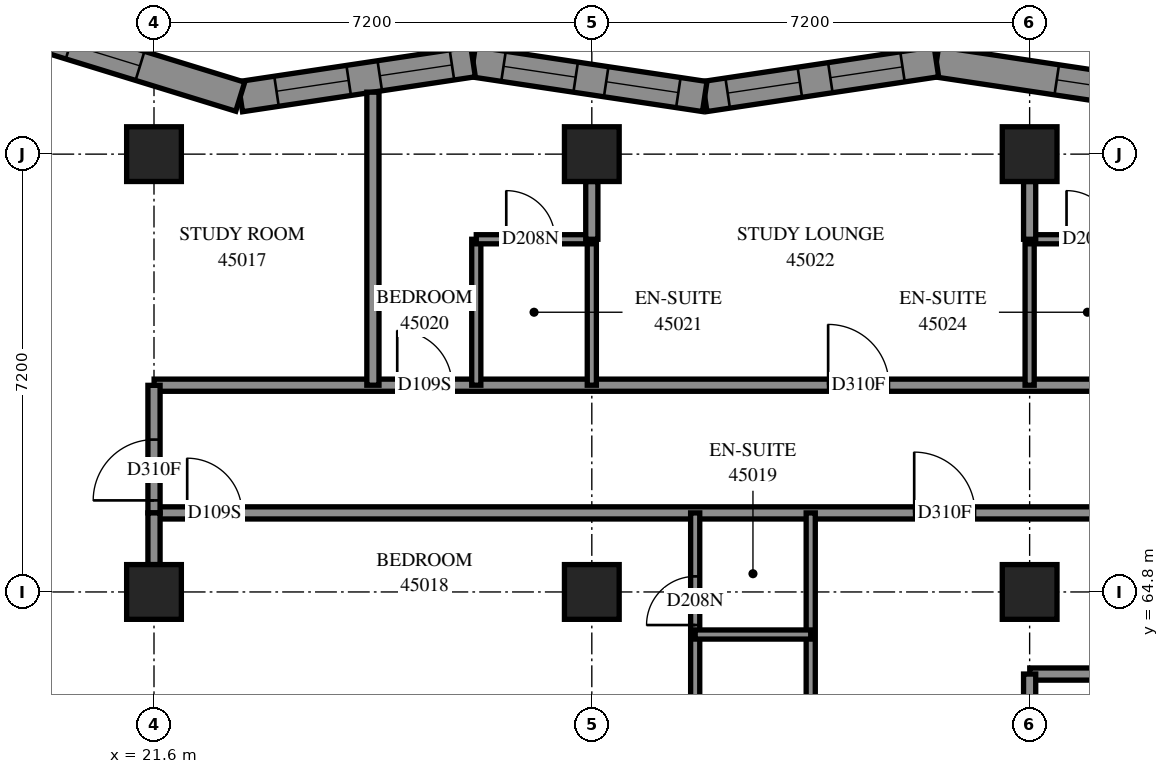
"""IFC4 building model, lengths in metres.
Left out: names, types, materials, properties, quantities, classifications, styles, units other than length and angle.
Written with IfcOpenShell. Run it as: python <this file> out.ifc"""

import sys

from ifc_helpers import new_model, si_unit, direction, frame, frame_2d, origin, origin_2d, place, context, subcontext, project, spatial, polyline, rectangle, outline, extrude, element, fill, save


model = new_model("IFC4")
c1 = context("Model", 3, precision=1e-05, world=origin(), true_north=direction((0.0, 1.0)))
c2 = subcontext(c1, "Body", "Model", "MODEL_VIEW")
j1 = project(units=[si_unit("LENGTHUNIT", "METRE"), si_unit("PLANEANGLEUNIT", "RADIAN")], contexts=[c1])
p1 = place(None, origin())
s1 = spatial("IfcSite", under=j1, at=p1, CompositionType="ELEMENT")
p2 = place(p1, origin())
s2 = spatial("IfcBuilding", under=s1, at=p2, CompositionType="ELEMENT")
p3 = place(p2, frame((0.0, 0.0, 166.0)))
s3 = spatial("IfcBuildingStorey", under=s2, at=p3, CompositionType="ELEMENT", Elevation=166.0)
for number, where, z_axis, x_axis in (
    (1, (21.6, 64.8, 0.0), (0.0, 0.0, 1.0), (1.0, 0.0, 0.0)),
    (2, (21.6, 72.0, 0.0), (0.0, 0.0, 1.0), (1.0, 0.0, 0.0)),
    (3, (28.8, 64.8, 0.0), (0.0, 0.0, 1.0), (1.0, 0.0, 0.0)),
    (4, (28.8, 72.0, 0.0), (0.0, 0.0, 1.0), (1.0, 0.0, 0.0)),
    (5, (36.0, 64.8, 0.0), (0.0, 0.0, 1.0), (1.0, 0.0, 0.0)),
    (6, (36.0, 72.0, 0.0), (0.0, 0.0, 1.0), (1.0, 0.0, 0.0)),
):
    element("IfcColumn", number, at=place(p3, frame(where, z_axis=z_axis, x_axis=x_axis)), inside=s3, PredefinedType="COLUMN", context=c2, shape_type="SweptSolid", body=[
        extrude(rectangle(XDim=0.9, YDim=0.9, at=origin_2d()), origin(), (0.0, 0.0, 1.0), 3.1),
    ])
p4 = place(p3, frame((38.276, 72.947, 0.0), z_axis=(0.0, 0.0, 1.0), x_axis=(-0.9889155896, 0.1484788086, 0.0)))
e7 = element("IfcWall", 7, at=p4, inside=s3, PredefinedType="SOLIDWALL", context=c2, shape_type="SweptSolid", body=[
    extrude(outline(polyline([(0.037, -0.25), (3.89, -0.25), (3.815, 0.25), (-0.037, 0.25), (0.037, -0.25)])), origin(), (0.0, 0.0, 1.0), 3.1),
])
p5 = place(p4, frame((0.651, 0.0, 0.45)))
e8 = element("IfcOpeningElement", 8, at=p5, cuts=e7, PredefinedType="OPENING", context=c2, shape_type="SweptSolid", body=[
    extrude(rectangle(XDim=1.2, YDim=2.5, at=frame_2d((0.6, 1.25))), frame((0.0, 0.26, 0.0), z_axis=(0.0, -1.0, 0.0), x_axis=(1.0, 0.0, 0.0)), (0.0, 0.0, 1.0), 0.52),
])
p6 = place(p3, frame((34.467, 73.519, 0.0), z_axis=(0.0, 0.0, 1.0), x_axis=(-0.9889150173, -0.1484826202, 0.0)))
e9 = element("IfcWall", 9, at=p6, inside=s3, PredefinedType="SOLIDWALL", context=c2, shape_type="SweptSolid", body=[
    extrude(outline(polyline([(-0.037, -0.25), (3.815, -0.25), (3.89, 0.25), (0.037, 0.25), (-0.037, -0.25)])), origin(), (0.0, 0.0, 1.0), 3.1),
])
p7 = place(p6, frame((0.564, 0.0, 0.45)))
e10 = element("IfcOpeningElement", 10, at=p7, cuts=e9, PredefinedType="OPENING", context=c2, shape_type="SweptSolid", body=[
    extrude(rectangle(XDim=1.2, YDim=2.5, at=frame_2d((0.6, 1.25))), frame((0.0, 0.26, 0.0), z_axis=(0.0, -1.0, 0.0), x_axis=(1.0, 0.0, 0.0)), (0.0, 0.0, 1.0), 0.52),
])
p8 = place(p6, frame((2.271, 0.0, 0.45)))
e11 = element("IfcOpeningElement", 11, at=p8, cuts=e9, PredefinedType="OPENING", context=c2, shape_type="SweptSolid", body=[
    extrude(rectangle(XDim=1.2, YDim=2.5, at=frame_2d((0.6, 1.25))), frame((0.0, 0.26, 0.0), z_axis=(0.0, -1.0, 0.0), x_axis=(1.0, 0.0, 0.0)), (0.0, 0.0, 1.0), 0.52),
])
p9 = place(p3, frame((30.657, 72.947, 0.0), z_axis=(0.0, 0.0, 1.0), x_axis=(-0.9889155896, 0.1484788086, 0.0)))
e12 = element("IfcWall", 12, at=p9, inside=s3, PredefinedType="SOLIDWALL", context=c2, shape_type="SweptSolid", body=[
    extrude(outline(polyline([(0.037, -0.25), (3.89, -0.25), (3.815, 0.25), (-0.037, 0.25), (0.037, -0.25)])), origin(), (0.0, 0.0, 1.0), 3.1),
])
p10 = place(p9, frame((0.439, 0.0, 0.45)))
e13 = element("IfcOpeningElement", 13, at=p10, cuts=e12, PredefinedType="OPENING", context=c2, shape_type="SweptSolid", body=[
    extrude(rectangle(XDim=1.2, YDim=2.5, at=frame_2d((0.6, 1.25))), frame((0.0, 0.26, 0.0), z_axis=(0.0, -1.0, 0.0), x_axis=(1.0, 0.0, 0.0)), (0.0, 0.0, 1.0), 0.52),
])
p11 = place(p9, frame((2.146, 0.0, 0.45)))
e14 = element("IfcOpeningElement", 14, at=p11, cuts=e12, PredefinedType="OPENING", context=c2, shape_type="SweptSolid", body=[
    extrude(rectangle(XDim=1.2, YDim=2.5, at=frame_2d((0.6, 1.25))), frame((0.0, 0.26, 0.0), z_axis=(0.0, -1.0, 0.0), x_axis=(1.0, 0.0, 0.0)), (0.0, 0.0, 1.0), 0.52),
])
p12 = place(p3, frame((26.847, 73.519, 0.0), z_axis=(0.0, 0.0, 1.0), x_axis=(-0.9889143658, -0.1484869591, 0.0)))
e15 = element("IfcWall", 15, at=p12, inside=s3, PredefinedType="SOLIDWALL", context=c2, shape_type="SweptSolid", body=[
    extrude(outline(polyline([(-0.037, -0.25), (3.815, -0.25), (3.929, 0.25), (0.037, 0.25), (-0.037, -0.25)])), origin(), (0.0, 0.0, 1.0), 3.1),
])
p13 = place(p12, frame((0.352, 0.0, 0.45)))
e16 = element("IfcOpeningElement", 16, at=p13, cuts=e15, PredefinedType="OPENING", context=c2, shape_type="SweptSolid", body=[
    extrude(rectangle(XDim=1.2, YDim=2.5, at=frame_2d((0.6, 1.25))), frame((0.0, 0.26, 0.0), z_axis=(0.0, -1.0, 0.0), x_axis=(1.0, 0.0, 0.0)), (0.0, 0.0, 1.0), 0.52),
])
p14 = place(p12, frame((2.069, 0.0, 0.45)))
e17 = element("IfcOpeningElement", 17, at=p14, cuts=e15, PredefinedType="OPENING", context=c2, shape_type="SweptSolid", body=[
    extrude(rectangle(XDim=1.2, YDim=2.5, at=frame_2d((0.6, 1.25))), frame((0.0, 0.26, 0.0), z_axis=(0.0, -1.0, 0.0), x_axis=(1.0, 0.0, 0.0)), (0.0, 0.0, 1.0), 0.52),
])
p15 = place(p3, frame((23.018, 72.944, 0.0), z_axis=(0.0, 0.0, 1.0), x_axis=(-0.9557930164, 0.2940403201, 0.0)))
e18 = element("IfcWall", 18, at=p15, inside=s3, PredefinedType="SOLIDWALL", context=c2, shape_type="SweptSolid", body=[
    extrude(outline(polyline([(0.057, -0.25), (4.043, -0.25), (3.366, 0.25), (-0.057, 0.25), (0.057, -0.25)])), origin(), (0.0, 0.0, 1.0), 3.1),
])
p16 = place(p15, frame((1.725, 0.0, 0.45)))
e19 = element("IfcOpeningElement", 19, at=p16, cuts=e18, PredefinedType="OPENING", context=c2, shape_type="SweptSolid", body=[
    extrude(rectangle(XDim=1.2, YDim=2.5, at=frame_2d((0.6, 1.25))), frame((0.0, 0.26, 0.0), z_axis=(0.0, -1.0, 0.0), x_axis=(1.0, 0.0, 0.0)), (0.0, 0.0, 1.0), 0.52),
])
p17 = place(p3, frame((21.602, 68.2, 0.0), z_axis=(0.0, 0.0, 1.0), x_axis=(1.0, 0.0, 0.0)))
e20 = element("IfcWall", 20, at=p17, inside=s3, PredefinedType="PARTITIONING", context=c2, shape_type="SweptSolid", body=[
    extrude(rectangle(XDim=19.048, YDim=0.2, at=frame_2d((9.524, 0.0))), origin(), (0.0, 0.0, 1.0), 3.1),
])
p18 = place(p17, frame((3.998, 0.0, 0.0)))
e21 = element("IfcOpeningElement", 21, at=p18, cuts=e20, PredefinedType="OPENING", context=c2, shape_type="SweptSolid", body=[
    extrude(rectangle(XDim=0.9, YDim=2.1, at=frame_2d((0.45, 1.05))), frame((0.0, 0.11, 0.0), z_axis=(0.0, -1.0, 0.0), x_axis=(1.0, 0.0, 0.0)), (0.0, 0.0, 1.0), 0.22),
])
p19 = place(p17, frame((11.084, 0.0, 0.0)))
e22 = element("IfcOpeningElement", 22, at=p19, cuts=e20, PredefinedType="OPENING", context=c2, shape_type="SweptSolid", body=[
    extrude(rectangle(XDim=1.0, YDim=2.1, at=frame_2d((0.5, 1.05))), frame((0.0, 0.11, 0.0), z_axis=(0.0, -1.0, 0.0), x_axis=(1.0, 0.0, 0.0)), (0.0, 0.0, 1.0), 0.22),
])
p20 = place(p17, frame((16.748, 0.0, 0.0)))
e23 = element("IfcOpeningElement", 23, at=p20, cuts=e20, PredefinedType="OPENING", context=c2, shape_type="SweptSolid", body=[
    extrude(rectangle(XDim=0.9, YDim=2.1, at=frame_2d((0.45, 1.05))), frame((0.0, 0.11, 0.0), z_axis=(0.0, -1.0, 0.0), x_axis=(1.0, 0.0, 0.0)), (0.0, 0.0, 1.0), 0.22),
])
p21 = place(p3, frame((21.6, 66.1, 0.0), z_axis=(0.0, 0.0, 1.0), x_axis=(1.0, 0.0, 0.0)))
e24 = element("IfcWall", 24, at=p21, inside=s3, PredefinedType="PARTITIONING", context=c2, shape_type="SweptSolid", body=[
    extrude(rectangle(XDim=16.95, YDim=0.2, at=frame_2d((8.475, 0.0))), origin(), (0.0, 0.0, 1.0), 3.1),
])
p22 = place(p21, frame((0.546, 0.0, 0.0)))
e25 = element("IfcOpeningElement", 25, at=p22, cuts=e24, PredefinedType="OPENING", context=c2, shape_type="SweptSolid", body=[
    extrude(rectangle(XDim=0.9, YDim=2.1, at=frame_2d((0.45, 1.05))), frame((0.0, 0.11, 0.0), z_axis=(0.0, -1.0, 0.0), x_axis=(1.0, 0.0, 0.0)), (0.0, 0.0, 1.0), 0.22),
])
p23 = place(p21, frame((12.502, 0.0, 0.0)))
e26 = element("IfcOpeningElement", 26, at=p23, cuts=e24, PredefinedType="OPENING", context=c2, shape_type="SweptSolid", body=[
    extrude(rectangle(XDim=1.0, YDim=2.1, at=frame_2d((0.5, 1.05))), frame((0.0, 0.11, 0.0), z_axis=(0.0, -1.0, 0.0), x_axis=(1.0, 0.0, 0.0)), (0.0, 0.0, 1.0), 0.22),
])
p24 = place(p3, frame((25.2, 68.2, 0.0), z_axis=(0.0, 0.0, 1.0), x_axis=(0.0, 1.0, 0.0)))
e27 = element("IfcWall", 27, at=p24, inside=s3, PredefinedType="PARTITIONING", context=c2, shape_type="SweptSolid", body=[
    extrude(rectangle(XDim=4.819, YDim=0.2, at=frame_2d((2.409, 0.0))), origin(), (0.0, 0.0, 1.0), 3.1),
])
p25 = place(p3, frame((32.4, 62.928, 0.0), z_axis=(0.0, 0.0, 1.0), x_axis=(0.0, 1.0, 0.0)))
e28 = element("IfcWall", 28, at=p25, inside=s3, PredefinedType="PARTITIONING", context=c2, shape_type="SweptSolid", body=[
    extrude(rectangle(XDim=3.172, YDim=0.15, at=frame_2d((1.586, 0.0))), origin(), (0.0, 0.0, 1.0), 3.1),
])
p26 = place(p3, frame((30.5, 62.928, 0.0), z_axis=(0.0, 0.0, 1.0), x_axis=(0.0, 1.0, 0.0)))
e29 = element("IfcWall", 29, at=p26, inside=s3, PredefinedType="PARTITIONING", context=c2, shape_type="SweptSolid", body=[
    extrude(rectangle(XDim=3.172, YDim=0.15, at=frame_2d((1.586, 0.0))), origin(), (0.0, 0.0, 1.0), 3.1),
])
p27 = place(p26, frame((1.328, 0.0, 0.0)))
e30 = element("IfcOpeningElement", 30, at=p27, cuts=e29, PredefinedType="OPENING", context=c2, shape_type="SweptSolid", body=[
    extrude(rectangle(XDim=0.8, YDim=2.1, at=frame_2d((0.4, 1.05))), frame((0.0, 0.085, 0.0), z_axis=(0.0, -1.0, 0.0), x_axis=(1.0, 0.0, 0.0)), (0.0, 0.0, 1.0), 0.17),
])
p28 = place(p3, frame((36.002, 63.45, 0.0), z_axis=(0.0, 0.0, 1.0), x_axis=(1.0, 0.0, 0.0)))
e31 = element("IfcWall", 31, at=p28, inside=s3, PredefinedType="PARTITIONING", context=c2, shape_type="SweptSolid", body=[
    extrude(rectangle(XDim=2.548, YDim=0.2, at=frame_2d((1.274, 0.0))), origin(), (0.0, 0.0, 1.0), 3.1),
])
for number, where, z_axis, x_axis in (
    (32, (26.9, 68.2, 0.0), (0.0, 0.0, 1.0), (0.0, 1.0, 0.0)),
    (33, (28.8, 68.2, 0.0), (0.0, 0.0, 1.0), (0.0, 1.0, 0.0)),
    (34, (36.0, 68.2, 0.0), (0.0, 0.0, 1.0), (0.0, 1.0, 0.0)),
):
    element("IfcWall", number, at=place(p3, frame(where, z_axis=z_axis, x_axis=x_axis)), inside=s3, PredefinedType="PARTITIONING", context=c2, shape_type="SweptSolid", body=[
        extrude(rectangle(XDim=2.4, YDim=0.15, at=frame_2d((1.2, 0.0))), origin(), (0.0, 0.0, 1.0), 3.1),
    ])
p29 = place(p3, frame((36.0, 61.35, 0.0), z_axis=(0.0, 0.0, 1.0), x_axis=(0.0, 1.0, 0.0)))
e35 = element("IfcWall", 35, at=p29, inside=s3, PredefinedType="PARTITIONING", context=c2, shape_type="SweptSolid", body=[
    extrude(rectangle(XDim=2.1, YDim=0.2, at=frame_2d((1.05, 0.0))), origin(), (0.0, 0.0, 1.0), 2.6),
])
p30 = place(p3, frame((21.6, 66.1, 0.0), z_axis=(0.0, 0.0, 1.0), x_axis=(0.0, 1.0, 0.0)))
e36 = element("IfcWall", 36, at=p30, inside=s3, PredefinedType="PARTITIONING", context=c2, shape_type="SweptSolid", body=[
    extrude(rectangle(XDim=2.098, YDim=0.2, at=frame_2d((1.049, 0.0))), origin(), (0.0, 0.0, 1.0), 2.6),
])
p31 = place(p30, frame((0.206, 0.0, 0.0)))
e37 = element("IfcOpeningElement", 37, at=p31, cuts=e36, PredefinedType="OPENING", context=c2, shape_type="SweptSolid", body=[
    extrude(rectangle(XDim=1.0, YDim=2.1, at=frame_2d((0.5, 1.05))), frame((0.0, 0.11, 0.0), z_axis=(0.0, -1.0, 0.0), x_axis=(1.0, 0.0, 0.0)), (0.0, 0.0, 1.0), 0.22),
])
p32 = place(p3, frame((26.9, 70.6, 0.0), z_axis=(0.0, 0.0, 1.0), x_axis=(1.0, 0.0, 0.0)))
e38 = element("IfcWall", 38, at=p32, inside=s3, PredefinedType="PARTITIONING", context=c2, shape_type="SweptSolid", body=[
    extrude(rectangle(XDim=1.9, YDim=0.15, at=frame_2d((0.95, 0.0))), origin(), (0.0, 0.0, 1.0), 3.1),
])
p33 = place(p32, frame((0.493, 0.0, 0.0)))
e39 = element("IfcOpeningElement", 39, at=p33, cuts=e38, PredefinedType="OPENING", context=c2, shape_type="SweptSolid", body=[
    extrude(rectangle(XDim=0.8, YDim=2.1, at=frame_2d((0.4, 1.05))), frame((0.0, 0.085, 0.0), z_axis=(0.0, -1.0, 0.0), x_axis=(1.0, 0.0, 0.0)), (0.0, 0.0, 1.0), 0.17),
])
p34 = place(p3, frame((36.0, 70.6, 0.0), z_axis=(0.0, 0.0, 1.0), x_axis=(1.0, 0.0, 0.0)))
e40 = element("IfcWall", 40, at=p34, inside=s3, PredefinedType="PARTITIONING", context=c2, shape_type="SweptSolid", body=[
    extrude(rectangle(XDim=1.9, YDim=0.15, at=frame_2d((0.95, 0.0))), origin(), (0.0, 0.0, 1.0), 3.1),
])
p35 = place(p34, frame((0.607, 0.0, 0.0)))
e41 = element("IfcOpeningElement", 41, at=p35, cuts=e40, PredefinedType="OPENING", context=c2, shape_type="SweptSolid", body=[
    extrude(rectangle(XDim=0.8, YDim=2.1, at=frame_2d((0.4, 1.05))), frame((0.0, 0.085, 0.0), z_axis=(0.0, -1.0, 0.0), x_axis=(1.0, 0.0, 0.0)), (0.0, 0.0, 1.0), 0.17),
])
p36 = place(p3, frame((30.5, 64.1, 0.0), z_axis=(0.0, 0.0, 1.0), x_axis=(1.0, 0.0, 0.0)))
e42 = element("IfcWall", 42, at=p36, inside=s3, PredefinedType="PARTITIONING", context=c2, shape_type="SweptSolid", body=[
    extrude(rectangle(XDim=1.9, YDim=0.15, at=frame_2d((0.95, 0.0))), origin(), (0.0, 0.0, 1.0), 3.1),
])
for number, where, z_axis, x_axis in (
    (43, (28.8, 70.6, 0.0), (0.0, 0.0, 1.0), (0.0, 1.0, 0.0)),
    (44, (36.0, 70.6, 0.0), (0.0, 0.0, 1.0), (0.0, 1.0, 0.0)),
):
    element("IfcWall", number, at=place(p3, frame(where, z_axis=z_axis, x_axis=x_axis)), inside=s3, PredefinedType="PARTITIONING", context=c2, shape_type="SweptSolid", body=[
        extrude(rectangle(XDim=0.95, YDim=0.2, at=frame_2d((0.475, 0.0))), origin(), (0.0, 0.0, 1.0), 3.1),
    ])
p37 = place(p3, frame((21.6, 65.25, 0.0), z_axis=(0.0, 0.0, 1.0), x_axis=(0.0, 1.0, 0.0)))
e45 = element("IfcWall", 45, at=p37, inside=s3, PredefinedType="PARTITIONING", context=c2, shape_type="SweptSolid", body=[
    extrude(rectangle(XDim=0.85, YDim=0.2, at=frame_2d((0.425, 0.0))), origin(), (0.0, 0.0, 1.0), 2.6),
])
p38 = place(p5, origin())
e46 = element("IfcWindow", 46, at=p38, inside=s3, PartitioningType="SINGLE_PANEL", PredefinedType="WINDOW", context=c2, shape_type="SweptSolid", body=[
    extrude(rectangle(XDim=1.2, YDim=2.5, at=frame_2d((0.6, 1.25))), frame((0.0, 0.18, 0.0), z_axis=(0.0, -1.0, 0.0), x_axis=(1.0, 0.0, 0.0)), (0.0, 0.0, 1.0), 0.06),
])
fill(e8, e46)
p39 = place(p7, origin())
e47 = element("IfcWindow", 47, at=p39, inside=s3, PartitioningType="SINGLE_PANEL", PredefinedType="WINDOW", context=c2, shape_type="SweptSolid", body=[
    extrude(rectangle(XDim=1.2, YDim=2.5, at=frame_2d((0.6, 1.25))), frame((0.0, 0.18, 0.0), z_axis=(0.0, -1.0, 0.0), x_axis=(1.0, 0.0, 0.0)), (0.0, 0.0, 1.0), 0.06),
])
fill(e10, e47)
p40 = place(p8, origin())
e48 = element("IfcWindow", 48, at=p40, inside=s3, PartitioningType="SINGLE_PANEL", PredefinedType="WINDOW", context=c2, shape_type="SweptSolid", body=[
    extrude(rectangle(XDim=1.2, YDim=2.5, at=frame_2d((0.6, 1.25))), frame((0.0, 0.18, 0.0), z_axis=(0.0, -1.0, 0.0), x_axis=(1.0, 0.0, 0.0)), (0.0, 0.0, 1.0), 0.06),
])
fill(e11, e48)
p41 = place(p10, origin())
e49 = element("IfcWindow", 49, at=p41, inside=s3, PartitioningType="SINGLE_PANEL", PredefinedType="WINDOW", context=c2, shape_type="SweptSolid", body=[
    extrude(rectangle(XDim=1.2, YDim=2.5, at=frame_2d((0.6, 1.25))), frame((0.0, 0.18, 0.0), z_axis=(0.0, -1.0, 0.0), x_axis=(1.0, 0.0, 0.0)), (0.0, 0.0, 1.0), 0.06),
])
fill(e13, e49)
p42 = place(p11, origin())
e50 = element("IfcWindow", 50, at=p42, inside=s3, PartitioningType="SINGLE_PANEL", PredefinedType="WINDOW", context=c2, shape_type="SweptSolid", body=[
    extrude(rectangle(XDim=1.2, YDim=2.5, at=frame_2d((0.6, 1.25))), frame((0.0, 0.18, 0.0), z_axis=(0.0, -1.0, 0.0), x_axis=(1.0, 0.0, 0.0)), (0.0, 0.0, 1.0), 0.06),
])
fill(e14, e50)
p43 = place(p13, origin())
e51 = element("IfcWindow", 51, at=p43, inside=s3, PartitioningType="SINGLE_PANEL", PredefinedType="WINDOW", context=c2, shape_type="SweptSolid", body=[
    extrude(rectangle(XDim=1.2, YDim=2.5, at=frame_2d((0.6, 1.25))), frame((0.0, 0.18, 0.0), z_axis=(0.0, -1.0, 0.0), x_axis=(1.0, 0.0, 0.0)), (0.0, 0.0, 1.0), 0.06),
])
fill(e16, e51)
p44 = place(p14, origin())
e52 = element("IfcWindow", 52, at=p44, inside=s3, PartitioningType="SINGLE_PANEL", PredefinedType="WINDOW", context=c2, shape_type="SweptSolid", body=[
    extrude(rectangle(XDim=1.2, YDim=2.5, at=frame_2d((0.6, 1.25))), frame((0.0, 0.18, 0.0), z_axis=(0.0, -1.0, 0.0), x_axis=(1.0, 0.0, 0.0)), (0.0, 0.0, 1.0), 0.06),
])
fill(e17, e52)
p45 = place(p16, origin())
e53 = element("IfcWindow", 53, at=p45, inside=s3, PartitioningType="SINGLE_PANEL", PredefinedType="WINDOW", context=c2, shape_type="SweptSolid", body=[
    extrude(rectangle(XDim=1.2, YDim=2.5, at=frame_2d((0.6, 1.25))), frame((0.0, 0.18, 0.0), z_axis=(0.0, -1.0, 0.0), x_axis=(1.0, 0.0, 0.0)), (0.0, 0.0, 1.0), 0.06),
])
fill(e19, e53)
p46 = place(p31, origin())
e54 = element("IfcDoor", 54, at=p46, inside=s3, OperationType="SINGLE_SWING_RIGHT", PredefinedType="DOOR", context=c2, shape_type="SweptSolid", body=[
    extrude(rectangle(XDim=1.0, YDim=2.1, at=frame_2d((0.5, 1.05))), frame((0.0, 0.025, 0.0), z_axis=(0.0, -1.0, 0.0), x_axis=(1.0, 0.0, 0.0)), (0.0, 0.0, 1.0), 0.05),
])
fill(e37, e54)
p47 = place(p22, origin())
e55 = element("IfcDoor", 55, at=p47, inside=s3, OperationType="SINGLE_SWING_LEFT", PredefinedType="DOOR", context=c2, shape_type="SweptSolid", body=[
    extrude(rectangle(XDim=0.9, YDim=2.1, at=frame_2d((0.45, 1.05))), frame((0.0, 0.025, 0.0), z_axis=(0.0, -1.0, 0.0), x_axis=(1.0, 0.0, 0.0)), (0.0, 0.0, 1.0), 0.05),
])
fill(e25, e55)
p48 = place(p27, origin())
e56 = element("IfcDoor", 56, at=p48, inside=s3, OperationType="SINGLE_SWING_RIGHT", PredefinedType="DOOR", context=c2, shape_type="SweptSolid", body=[
    extrude(rectangle(XDim=0.8, YDim=2.1, at=frame_2d((0.4, 1.05))), frame((0.0, 0.025, 0.0), z_axis=(0.0, -1.0, 0.0), x_axis=(1.0, 0.0, 0.0)), (0.0, 0.0, 1.0), 0.05),
])
fill(e30, e56)
p49 = place(p18, origin())
e57 = element("IfcDoor", 57, at=p49, inside=s3, OperationType="SINGLE_SWING_LEFT", PredefinedType="DOOR", context=c2, shape_type="SweptSolid", body=[
    extrude(rectangle(XDim=0.9, YDim=2.1, at=frame_2d((0.45, 1.05))), frame((0.0, 0.025, 0.0), z_axis=(0.0, -1.0, 0.0), x_axis=(1.0, 0.0, 0.0)), (0.0, 0.0, 1.0), 0.05),
])
fill(e21, e57)
p50 = place(p33, origin())
e58 = element("IfcDoor", 58, at=p50, inside=s3, OperationType="SINGLE_SWING_RIGHT", PredefinedType="DOOR", context=c2, shape_type="SweptSolid", body=[
    extrude(rectangle(XDim=0.8, YDim=2.1, at=frame_2d((0.4, 1.05))), frame((0.0, 0.025, 0.0), z_axis=(0.0, -1.0, 0.0), x_axis=(1.0, 0.0, 0.0)), (0.0, 0.0, 1.0), 0.05),
])
fill(e39, e58)
p51 = place(p19, origin())
e59 = element("IfcDoor", 59, at=p51, inside=s3, OperationType="SINGLE_SWING_RIGHT", PredefinedType="DOOR", context=c2, shape_type="SweptSolid", body=[
    extrude(rectangle(XDim=1.0, YDim=2.1, at=frame_2d((0.5, 1.05))), frame((0.0, 0.025, 0.0), z_axis=(0.0, -1.0, 0.0), x_axis=(1.0, 0.0, 0.0)), (0.0, 0.0, 1.0), 0.05),
])
fill(e22, e59)
p52 = place(p35, origin())
e60 = element("IfcDoor", 60, at=p52, inside=s3, OperationType="SINGLE_SWING_RIGHT", PredefinedType="DOOR", context=c2, shape_type="SweptSolid", body=[
    extrude(rectangle(XDim=0.8, YDim=2.1, at=frame_2d((0.4, 1.05))), frame((0.0, 0.025, 0.0), z_axis=(0.0, -1.0, 0.0), x_axis=(1.0, 0.0, 0.0)), (0.0, 0.0, 1.0), 0.05),
])
fill(e41, e60)
p53 = place(p23, origin())
e61 = element("IfcDoor", 61, at=p53, inside=s3, OperationType="SINGLE_SWING_RIGHT", PredefinedType="DOOR", context=c2, shape_type="SweptSolid", body=[
    extrude(rectangle(XDim=1.0, YDim=2.1, at=frame_2d((0.5, 1.05))), frame((0.0, 0.025, 0.0), z_axis=(0.0, -1.0, 0.0), x_axis=(1.0, 0.0, 0.0)), (0.0, 0.0, 1.0), 0.05),
])
fill(e26, e61)
save(model, sys.argv[1])
